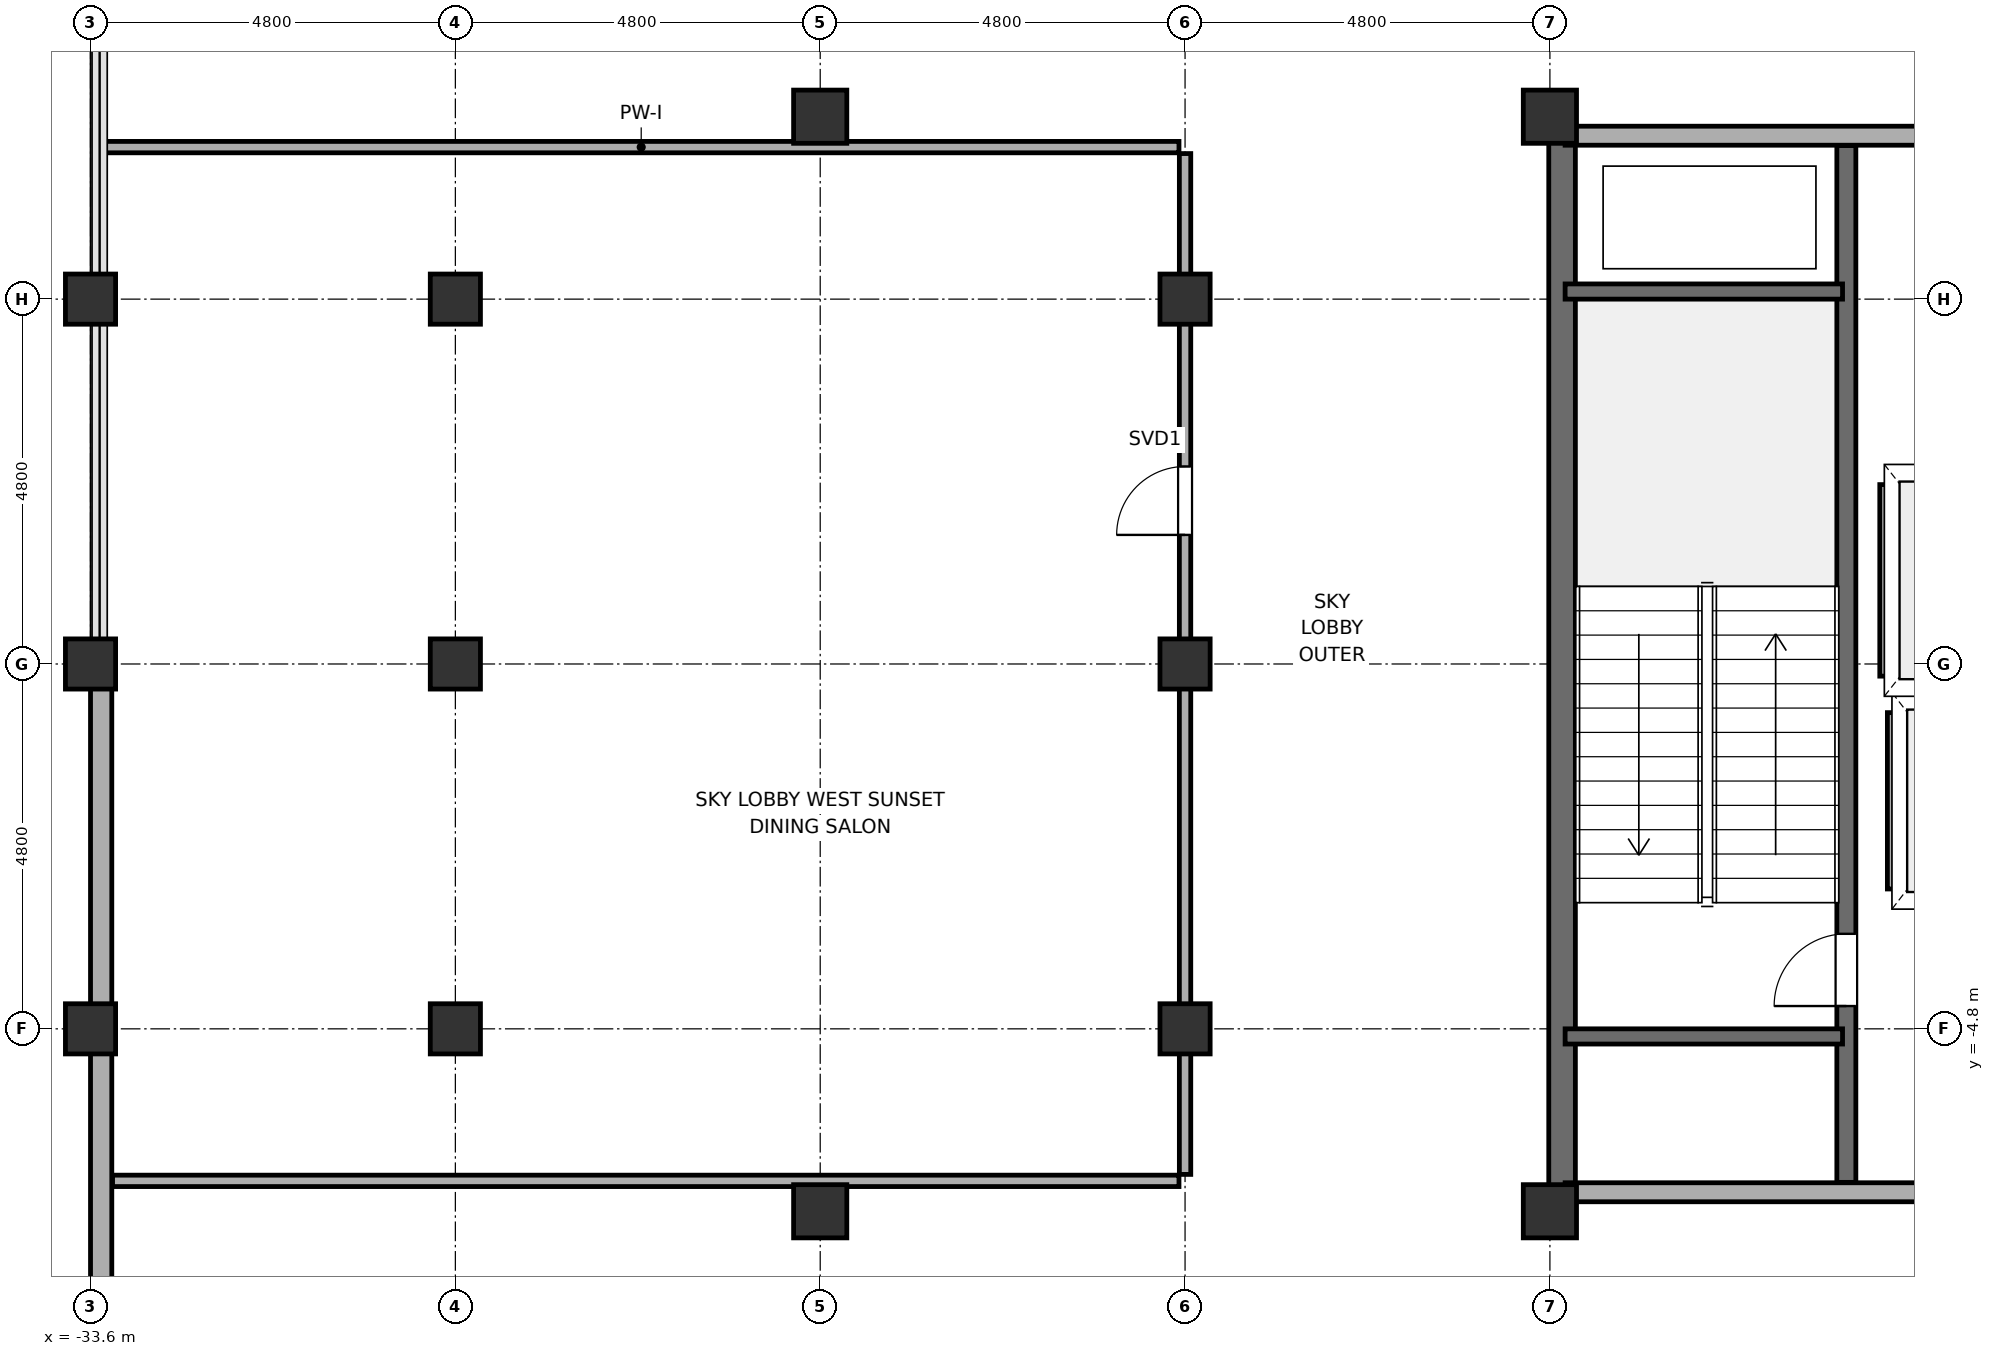
"""IFC4 building model, lengths in metres.
Left out: names, types, materials, properties, quantities, classifications, styles, units other than length and angle.
Written with IfcOpenShell. Run it as: python <this file> out.ifc"""

import sys

from ifc_helpers import new_model, si_unit, direction, frame, frame_2d, origin, origin_2d, place, context, subcontext, project, spatial, rectangle, hollow_rectangle, hollow_circle, extrude, element, fill, save


model = new_model("IFC4")
c1 = context("Model", 3, precision=1e-05, world=origin(), true_north=direction((0.0, 1.0)))
c2 = subcontext(c1, "Body", "Model", "MODEL_VIEW")
j1 = project(units=[si_unit("LENGTHUNIT", "METRE"), si_unit("PLANEANGLEUNIT", "RADIAN")], contexts=[c1])
p1 = place(None, origin())
s1 = spatial("IfcSite", under=j1, at=p1, CompositionType="ELEMENT")
p2 = place(p1, origin())
s2 = spatial("IfcBuilding", under=s1, at=p2, CompositionType="ELEMENT")
p3 = place(p2, frame((0.0, 0.0, 180.3)))
s3 = spatial("IfcBuildingStorey", under=s2, at=p3, CompositionType="ELEMENT", Elevation=180.3)
for number, where, z_axis, x_axis in (
    (1, (-33.6, -4.8, 0.0), (0.0, 0.0, 1.0), (1.0, 0.0, 0.0)),
    (2, (-33.6, 0.0, 0.0), (0.0, 0.0, 1.0), (1.0, 0.0, 0.0)),
    (3, (-33.6, 4.8, 0.0), (0.0, 0.0, 1.0), (1.0, 0.0, 0.0)),
    (4, (-28.8, -4.8, 0.0), (0.0, 0.0, 1.0), (1.0, 0.0, 0.0)),
    (5, (-28.8, 0.0, 0.0), (0.0, 0.0, 1.0), (1.0, 0.0, 0.0)),
    (6, (-28.8, 4.8, 0.0), (0.0, 0.0, 1.0), (1.0, 0.0, 0.0)),
):
    element("IfcColumn", number, at=place(p3, frame(where, z_axis=z_axis, x_axis=x_axis)), inside=s3, PredefinedType="COLUMN", context=c2, shape_type="SweptSolid", body=[
        extrude(hollow_circle(Radius=0.33, WallThickness=0.028, at=origin_2d()), origin(), (0.0, 0.0, 1.0), 5.2),
    ])
for number, where, z_axis, x_axis in (
    (7, (-24.0, -7.2, 0.0), (0.0, 0.0, 1.0), (1.0, 0.0, 0.0)),
    (8, (-24.0, 7.2, 0.0), (0.0, 0.0, 1.0), (1.0, 0.0, 0.0)),
):
    element("IfcColumn", number, at=place(p3, frame(where, z_axis=z_axis, x_axis=x_axis)), inside=s3, PredefinedType="COLUMN", context=c2, shape_type="SweptSolid", body=[
        extrude(hollow_rectangle(XDim=0.7, YDim=0.7, WallThickness=0.032, at=origin_2d()), origin(), (0.0, 0.0, 1.0), 5.2),
    ])
for number, where, z_axis, x_axis in (
    (9, (-19.2, -4.8, 0.0), (0.0, 0.0, 1.0), (1.0, 0.0, 0.0)),
    (10, (-19.2, 0.0, 0.0), (0.0, 0.0, 1.0), (1.0, 0.0, 0.0)),
    (11, (-19.2, 4.8, 0.0), (0.0, 0.0, 1.0), (1.0, 0.0, 0.0)),
):
    element("IfcColumn", number, at=place(p3, frame(where, z_axis=z_axis, x_axis=x_axis)), inside=s3, PredefinedType="COLUMN", context=c2, shape_type="SweptSolid", body=[
        extrude(hollow_circle(Radius=0.33, WallThickness=0.028, at=origin_2d()), origin(), (0.0, 0.0, 1.0), 5.2),
    ])
for number, where, z_axis, x_axis in (
    (12, (-14.4, -7.2, 0.0), (0.0, 0.0, 1.0), (1.0, 0.0, 0.0)),
    (13, (-14.4, 7.2, 0.0), (0.0, 0.0, 1.0), (1.0, 0.0, 0.0)),
):
    element("IfcColumn", number, at=place(p3, frame(where, z_axis=z_axis, x_axis=x_axis)), inside=s3, PredefinedType="COLUMN", context=c2, shape_type="SweptSolid", body=[
        extrude(hollow_rectangle(XDim=0.7, YDim=0.7, WallThickness=0.032, at=origin_2d()), origin(), (0.0, 0.0, 1.0), 5.2),
    ])
p4 = place(p3, frame((-14.24, -7.2, -0.22), z_axis=(0.0, 0.0, 1.0), x_axis=(0.0, 1.0, 0.0)))
e14 = element("IfcWall", 14, at=p4, inside=s3, PredefinedType="SHEAR", context=c2, shape_type="SweptSolid", body=[
    extrude(rectangle(XDim=14.4, YDim=0.35, at=frame_2d((7.2, 0.0))), origin(), (0.0, 0.0, 1.0), 5.17),
])
p5 = place(p3, frame((-33.46, -20.4, 0.0), z_axis=(0.0, 0.0, 1.0), x_axis=(0.0, 1.0, 0.0)))
e15 = element("IfcWall", 15, at=p5, inside=s3, PredefinedType="SOLIDWALL", context=c2, shape_type="SweptSolid", body=[
    extrude(rectangle(XDim=20.38, YDim=0.28, at=frame_2d((10.19, 0.0))), origin(), (0.0, 0.0, 1.0), 3.55),
])
p6 = place(p3, frame((-14.2, -6.95, 0.0), z_axis=(0.0, 0.0, 1.0), x_axis=(1.0, 0.0, 0.0)))
e16 = element("IfcWall", 16, at=p6, inside=s3, PredefinedType="SOLIDWALL", context=c2, shape_type="SweptSolid", body=[
    extrude(rectangle(XDim=9.4, YDim=0.25, at=frame_2d((4.7, 0.0))), origin(), (0.0, 0.0, 1.0), 3.55),
])
p7 = place(p6, frame((4.9, 0.0, 0.0)))
e17 = element("IfcOpeningElement", 17, at=p7, cuts=e16, PredefinedType="OPENING", context=c2, shape_type="SweptSolid", body=[
    extrude(rectangle(XDim=1.0, YDim=2.15, at=frame_2d((0.5, 1.075))), frame((0.0, 0.14, 0.0), z_axis=(0.0, -1.0, 0.0), x_axis=(1.0, 0.0, 0.0)), (0.0, 0.0, 1.0), 0.28),
])
p8 = place(p3, frame((-14.2, 6.95, 0.0), z_axis=(0.0, 0.0, 1.0), x_axis=(1.0, 0.0, 0.0)))
e18 = element("IfcWall", 18, at=p8, inside=s3, PredefinedType="SOLIDWALL", context=c2, shape_type="SweptSolid", body=[
    extrude(rectangle(XDim=9.4, YDim=0.25, at=frame_2d((4.7, 0.0))), origin(), (0.0, 0.0, 1.0), 3.55),
])
p9 = place(p8, frame((4.9, 0.0, 0.0)))
e19 = element("IfcOpeningElement", 19, at=p9, cuts=e18, PredefinedType="OPENING", context=c2, shape_type="SweptSolid", body=[
    extrude(rectangle(XDim=1.0, YDim=2.15, at=frame_2d((0.5, 1.075))), frame((0.0, 0.14, 0.0), z_axis=(0.0, -1.0, 0.0), x_axis=(1.0, 0.0, 0.0)), (0.0, 0.0, 1.0), 0.28),
])
p10 = place(p3, frame((-10.5, -6.82, -0.22), z_axis=(0.0, 0.0, 1.0), x_axis=(0.0, 1.0, 0.0)))
e20 = element("IfcWall", 20, at=p10, inside=s3, PredefinedType="SOLIDWALL", context=c2, shape_type="SweptSolid", body=[
    extrude(rectangle(XDim=13.64, YDim=0.25, at=frame_2d((6.82, 0.0))), origin(), (0.0, 0.0, 1.0), 5.17),
])
p11 = place(p10, frame((2.32, 0.0, 0.22)))
e21 = element("IfcOpeningElement", 21, at=p11, cuts=e20, PredefinedType="OPENING", context=c2, shape_type="SweptSolid", body=[
    extrude(rectangle(XDim=0.95, YDim=2.15, at=frame_2d((0.475, 1.075))), frame((0.0, 0.14, 0.0), z_axis=(0.0, -1.0, 0.0), x_axis=(1.0, 0.0, 0.0)), (0.0, 0.0, 1.0), 0.28),
])
for number, where, z_axis, x_axis in (
    (22, (-14.2, -4.9, -0.22), (0.0, 0.0, 1.0), (1.0, 0.0, 0.0)),
    (23, (-14.2, 4.9, -0.22), (0.0, 0.0, 1.0), (1.0, 0.0, 0.0)),
):
    element("IfcWall", number, at=place(p3, frame(where, z_axis=z_axis, x_axis=x_axis)), inside=s3, PredefinedType="SOLIDWALL", context=c2, shape_type="SweptSolid", body=[
        extrude(rectangle(XDim=3.65, YDim=0.2, at=frame_2d((1.825, 0.0))), origin(), (0.0, 0.0, 1.0), 5.17),
    ])
p12 = place(p3, frame((-9.82, -3.1, 0.0), z_axis=(0.0, 0.0, 1.0), x_axis=(1.0, 0.0, 0.0)))
e24 = element("IfcWall", 24, at=p12, inside=s3, PredefinedType="SOLIDWALL", context=c2, shape_type="SweptSolid", body=[
    extrude(rectangle(XDim=2.04, YDim=0.2, at=frame_2d((1.02, 0.0))), origin(), (0.0, 0.0, 1.0), 4.95),
])
p13 = place(p12, frame((0.47, 0.0, 0.0)))
e25 = element("IfcOpeningElement", 25, at=p13, cuts=e24, PredefinedType="OPENING", context=c2, shape_type="SweptSolid", body=[
    extrude(rectangle(XDim=1.1, YDim=2.2, at=frame_2d((0.55, 1.1))), frame((0.0, 0.115, 0.0), z_axis=(0.0, -1.0, 0.0), x_axis=(1.0, 0.0, 0.0)), (0.0, 0.0, 1.0), 0.23),
])
p14 = place(p3, frame((-9.82, -0.5, 0.0), z_axis=(0.0, 0.0, 1.0), x_axis=(1.0, 0.0, 0.0)))
e26 = element("IfcWall", 26, at=p14, inside=s3, PredefinedType="SOLIDWALL", context=c2, shape_type="SweptSolid", body=[
    extrude(rectangle(XDim=2.04, YDim=0.2, at=frame_2d((1.02, 0.0))), origin(), (0.0, 0.0, 1.0), 4.95),
])
p15 = place(p3, frame((-9.9, -2.96, 0.0), z_axis=(0.0, 0.0, 1.0), x_axis=(0.0, 1.0, 0.0)))
e27 = element("IfcWall", 27, at=p15, inside=s3, PredefinedType="PARTITIONING", context=c2, shape_type="SweptSolid", body=[
    extrude(rectangle(XDim=2.32, YDim=0.12, at=frame_2d((1.16, 0.0))), origin(), (0.0, 0.0, 1.0), 4.95),
])
p16 = place(p3, frame((-9.92, 2.5, 0.0), z_axis=(0.0, 0.0, 1.0), x_axis=(1.0, 0.0, 0.0)))
e28 = element("IfcWall", 28, at=p16, inside=s3, PredefinedType="SOLIDWALL", context=c2, shape_type="SweptSolid", body=[
    extrude(rectangle(XDim=2.24, YDim=0.2, at=frame_2d((1.12, 0.0))), origin(), (0.0, 0.0, 1.0), 4.95),
])
p17 = place(p16, frame((0.495, 0.0, 0.0)))
e29 = element("IfcOpeningElement", 29, at=p17, cuts=e28, PredefinedType="OPENING", context=c2, shape_type="SweptSolid", body=[
    extrude(rectangle(XDim=1.25, YDim=2.25, at=frame_2d((0.625, 1.125))), frame((0.0, 0.115, 0.0), z_axis=(0.0, -1.0, 0.0), x_axis=(1.0, 0.0, 0.0)), (0.0, 0.0, 1.0), 0.23),
])
p18 = place(p3, frame((-9.92, -0.3, 0.0), z_axis=(0.0, 0.0, 1.0), x_axis=(1.0, 0.0, 0.0)))
e30 = element("IfcWall", 30, at=p18, inside=s3, PredefinedType="SOLIDWALL", context=c2, shape_type="SweptSolid", body=[
    extrude(rectangle(XDim=2.24, YDim=0.2, at=frame_2d((1.12, 0.0))), origin(), (0.0, 0.0, 1.0), 4.95),
])
p19 = place(p3, frame((-10.0, -0.16, 0.0), z_axis=(0.0, 0.0, 1.0), x_axis=(0.0, 1.0, 0.0)))
e31 = element("IfcWall", 31, at=p19, inside=s3, PredefinedType="PARTITIONING", context=c2, shape_type="SweptSolid", body=[
    extrude(rectangle(XDim=2.52, YDim=0.12, at=frame_2d((1.26, 0.0))), origin(), (0.0, 0.0, 1.0), 4.95),
])
p20 = place(p3, frame((-33.31, -6.8, 0.0), z_axis=(0.0, 0.0, 1.0), x_axis=(1.0, 0.0, 0.0)))
e32 = element("IfcWall", 32, at=p20, inside=s3, PredefinedType="PARTITIONING", context=c2, shape_type="SweptSolid", body=[
    extrude(rectangle(XDim=14.03, YDim=0.15, at=frame_2d((7.015, 0.0))), origin(), (0.0, 0.0, 1.0), 3.55),
])
p21 = place(p3, frame((-33.43, 6.8, 0.0), z_axis=(0.0, 0.0, 1.0), x_axis=(1.0, 0.0, 0.0)))
e33 = element("IfcWall", 33, at=p21, inside=s3, PredefinedType="PARTITIONING", context=c2, shape_type="SweptSolid", body=[
    extrude(rectangle(XDim=14.15, YDim=0.15, at=frame_2d((7.075, 0.0))), origin(), (0.0, 0.0, 1.0), 3.55),
])
p22 = place(p3, frame((-19.2, -6.715, 0.0), z_axis=(0.0, 0.0, 1.0), x_axis=(0.0, 1.0, 0.0)))
e34 = element("IfcWall", 34, at=p22, inside=s3, PredefinedType="PARTITIONING", context=c2, shape_type="SweptSolid", body=[
    extrude(rectangle(XDim=13.43, YDim=0.15, at=frame_2d((6.715, 0.0))), origin(), (0.0, 0.0, 1.0), 3.55),
])
p23 = place(p22, frame((8.413, 0.0, 0.0)))
e35 = element("IfcOpeningElement", 35, at=p23, cuts=e34, PredefinedType="OPENING", context=c2, shape_type="SweptSolid", body=[
    extrude(rectangle(XDim=0.9, YDim=2.1, at=frame_2d((0.45, 1.05))), frame((0.0, 0.09, 0.0), z_axis=(0.0, -1.0, 0.0), x_axis=(1.0, 0.0, 0.0)), (0.0, 0.0, 1.0), 0.18),
])
p24 = place(p11, origin())
e36 = element("IfcDoor", 36, at=p24, inside=s3, OperationType="SINGLE_SWING_RIGHT", PredefinedType="DOOR", context=c2, shape_type="SweptSolid", body=[
    extrude(rectangle(XDim=0.95, YDim=2.15, at=frame_2d((0.475, 1.075))), frame((0.0, 0.025, 0.0), z_axis=(0.0, -1.0, 0.0), x_axis=(1.0, 0.0, 0.0)), (0.0, 0.0, 1.0), 0.05),
])
fill(e21, e36)
p25 = place(p23, origin())
e37 = element("IfcDoor", 37, at=p25, inside=s3, OperationType="SINGLE_SWING_LEFT", PredefinedType="DOOR", context=c2, shape_type="SweptSolid", body=[
    extrude(rectangle(XDim=0.9, YDim=2.1, at=frame_2d((0.45, 1.05))), frame((0.0, 0.025, 0.0), z_axis=(0.0, -1.0, 0.0), x_axis=(1.0, 0.0, 0.0)), (0.0, 0.0, 1.0), 0.05),
])
fill(e35, e37)
save(model, sys.argv[1])
